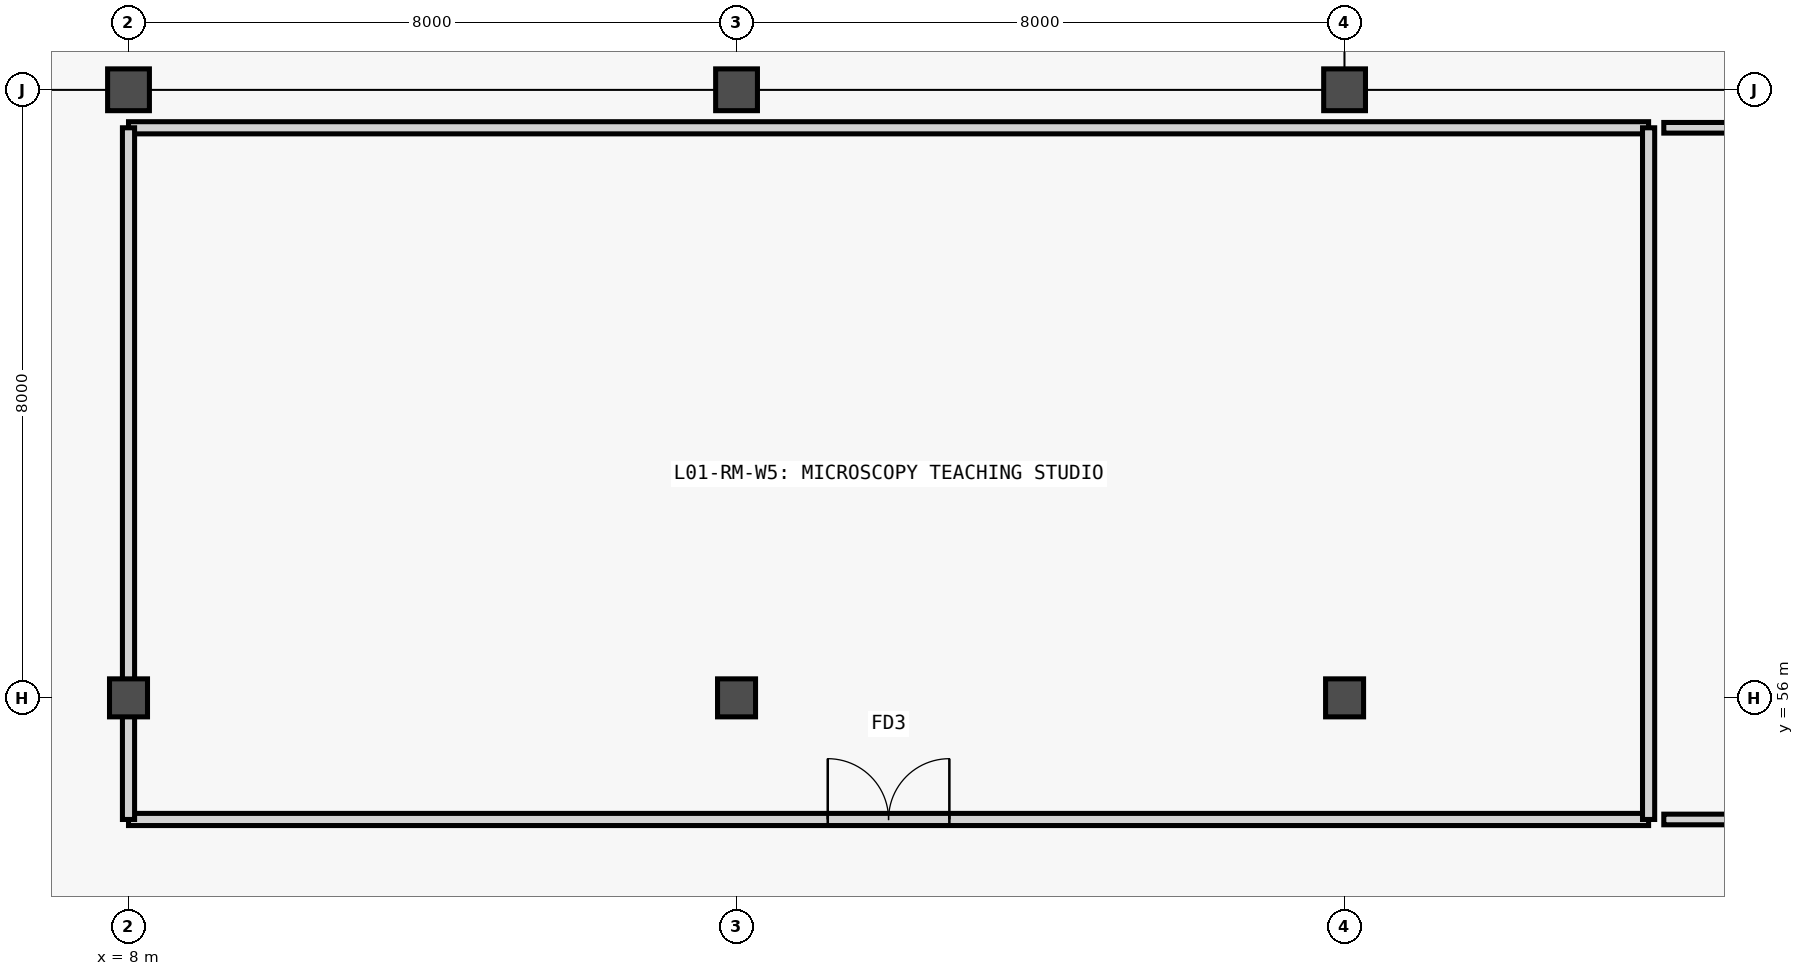
"""IFC4 building model, lengths in metres.
Left out: names, types, materials, properties, quantities, classifications, styles, units other than length and angle.
Written with IfcOpenShell. Run it as: python <this file> out.ifc"""

import sys

from ifc_helpers import new_model, si_unit, direction, frame, frame_2d, origin, origin_2d, place, context, subcontext, project, spatial, rectangle, extrude, element, fill, save


model = new_model("IFC4")
c1 = context("Model", 3, precision=1e-05, world=origin(), true_north=direction((0.0, 1.0)))
c2 = subcontext(c1, "Body", "Model", "MODEL_VIEW")
j1 = project(units=[si_unit("LENGTHUNIT", "METRE"), si_unit("PLANEANGLEUNIT", "RADIAN")], contexts=[c1])
p1 = place(None, origin())
s1 = spatial("IfcSite", under=j1, at=p1, CompositionType="ELEMENT")
p2 = place(p1, origin())
s2 = spatial("IfcBuilding", under=s1, at=p2, CompositionType="ELEMENT")
p3 = place(p2, frame((0.0, 0.0, 5.4)))
s3 = spatial("IfcBuildingStorey", under=s2, at=p3, CompositionType="ELEMENT", Elevation=5.4)
p4 = place(p3, frame((8.0, 56.0, 0.0), z_axis=(0.0, 0.0, 1.0), x_axis=(1.0, 0.0, 0.0)))
e1 = element("IfcColumn", 1, at=p4, inside=s3, PredefinedType="COLUMN", context=c2, shape_type="SweptSolid", body=[
    extrude(rectangle(XDim=0.5, YDim=0.5, at=origin_2d()), origin(), (0.0, 0.0, 1.0), 4.8),
])
p5 = place(p3, frame((8.0, 64.0, 0.0), z_axis=(0.0, 0.0, 1.0), x_axis=(1.0, 0.0, 0.0)))
e2 = element("IfcColumn", 2, at=p5, inside=s3, PredefinedType="COLUMN", context=c2, shape_type="SweptSolid", body=[
    extrude(rectangle(XDim=0.55, YDim=0.55, at=origin_2d()), origin(), (0.0, 0.0, 1.0), 4.8),
])
p6 = place(p3, frame((16.0, 56.0, 0.0), z_axis=(0.0, 0.0, 1.0), x_axis=(1.0, 0.0, 0.0)))
e3 = element("IfcColumn", 3, at=p6, inside=s3, PredefinedType="COLUMN", context=c2, shape_type="SweptSolid", body=[
    extrude(rectangle(XDim=0.5, YDim=0.5, at=origin_2d()), origin(), (0.0, 0.0, 1.0), 4.8),
])
p7 = place(p3, frame((16.0, 64.0, 0.0), z_axis=(0.0, 0.0, 1.0), x_axis=(1.0, 0.0, 0.0)))
e4 = element("IfcColumn", 4, at=p7, inside=s3, PredefinedType="COLUMN", context=c2, shape_type="SweptSolid", body=[
    extrude(rectangle(XDim=0.55, YDim=0.55, at=origin_2d()), origin(), (0.0, 0.0, 1.0), 4.8),
])
p8 = place(p3, frame((24.0, 56.0, 0.0), z_axis=(0.0, 0.0, 1.0), x_axis=(1.0, 0.0, 0.0)))
e5 = element("IfcColumn", 5, at=p8, inside=s3, PredefinedType="COLUMN", context=c2, shape_type="SweptSolid", body=[
    extrude(rectangle(XDim=0.5, YDim=0.5, at=origin_2d()), origin(), (0.0, 0.0, 1.0), 4.8),
])
p9 = place(p3, frame((24.0, 64.0, 0.0), z_axis=(0.0, 0.0, 1.0), x_axis=(1.0, 0.0, 0.0)))
e6 = element("IfcColumn", 6, at=p9, inside=s3, PredefinedType="COLUMN", context=c2, shape_type="SweptSolid", body=[
    extrude(rectangle(XDim=0.55, YDim=0.55, at=origin_2d()), origin(), (0.0, 0.0, 1.0), 4.8),
])
p10 = place(p3, frame((8.0, 54.4, 0.0), z_axis=(0.0, 0.0, 1.0), x_axis=(1.0, 0.0, 0.0)))
e7 = element("IfcWall", 7, at=p10, inside=s3, PredefinedType="PARTITIONING", context=c2, shape_type="SweptSolid", body=[
    extrude(rectangle(XDim=20.0, YDim=0.16, at=frame_2d((10.0, 0.0))), origin(), (0.0, 0.0, 1.0), 4.54),
])
p11 = place(p10, frame((9.2, 0.0, 0.0)))
e8 = element("IfcOpeningElement", 8, at=p11, cuts=e7, PredefinedType="OPENING", context=c2, shape_type="SweptSolid", body=[
    extrude(rectangle(XDim=1.6, YDim=2.2, at=frame_2d((0.8, 1.1))), frame((0.0, 0.09, 0.0), z_axis=(0.0, -1.0, 0.0), x_axis=(1.0, 0.0, 0.0)), (0.0, 0.0, 1.0), 0.18),
])
p12 = place(p3, frame((8.0, 63.5, 0.0), z_axis=(0.0, 0.0, 1.0), x_axis=(1.0, 0.0, 0.0)))
e9 = element("IfcWall", 9, at=p12, inside=s3, PredefinedType="PARTITIONING", context=c2, shape_type="SweptSolid", body=[
    extrude(rectangle(XDim=20.0, YDim=0.16, at=frame_2d((10.0, 0.0))), origin(), (0.0, 0.0, 1.0), 4.54),
])
p13 = place(p3, frame((8.0, 54.4, 0.0), z_axis=(0.0, 0.0, 1.0), x_axis=(0.0, 1.0, 0.0)))
e10 = element("IfcWall", 10, at=p13, inside=s3, PredefinedType="PARTITIONING", context=c2, shape_type="SweptSolid", body=[
    extrude(rectangle(XDim=9.1, YDim=0.16, at=frame_2d((4.55, 0.0))), origin(), (0.0, 0.0, 1.0), 3.92),
])
p14 = place(p3, frame((28.0, 54.4, 0.0), z_axis=(0.0, 0.0, 1.0), x_axis=(0.0, 1.0, 0.0)))
e11 = element("IfcWall", 11, at=p14, inside=s3, PredefinedType="PARTITIONING", context=c2, shape_type="SweptSolid", body=[
    extrude(rectangle(XDim=9.1, YDim=0.16, at=frame_2d((4.55, 0.0))), origin(), (0.0, 0.0, 1.0), 4.08),
])
p15 = place(p3, frame((28.2, 54.4, 0.0), z_axis=(0.0, 0.0, 1.0), x_axis=(1.0, 0.0, 0.0)))
e12 = element("IfcWall", 12, at=p15, inside=s3, PredefinedType="PARTITIONING", context=c2, shape_type="SweptSolid", body=[
    extrude(rectangle(XDim=27.3, YDim=0.14, at=frame_2d((13.65, 0.0))), origin(), (0.0, 0.0, 1.0), 4.54),
])
p16 = place(p15, frame((13.175, 0.0, 0.0)))
e13 = element("IfcOpeningElement", 13, at=p16, cuts=e12, PredefinedType="OPENING", context=c2, shape_type="SweptSolid", body=[
    extrude(rectangle(XDim=0.95, YDim=2.1, at=frame_2d((0.475, 1.05))), frame((0.0, 0.08, 0.0), z_axis=(0.0, -1.0, 0.0), x_axis=(1.0, 0.0, 0.0)), (0.0, 0.0, 1.0), 0.16),
])
p17 = place(p3, frame((28.2, 63.5, 0.0), z_axis=(0.0, 0.0, 1.0), x_axis=(1.0, 0.0, 0.0)))
e14 = element("IfcWall", 14, at=p17, inside=s3, PredefinedType="PARTITIONING", context=c2, shape_type="SweptSolid", body=[
    extrude(rectangle(XDim=27.3, YDim=0.14, at=frame_2d((13.65, 0.0))), origin(), (0.0, 0.0, 1.0), 4.54),
])
p18 = place(p11, origin())
e15 = element("IfcDoor", 15, at=p18, inside=s3, OperationType="DOUBLE_DOOR_SINGLE_SWING", PredefinedType="DOOR", context=c2, shape_type="SweptSolid", body=[
    extrude(rectangle(XDim=1.6, YDim=2.2, at=frame_2d((0.8, 1.1))), frame((0.0, 0.025, 0.0), z_axis=(0.0, -1.0, 0.0), x_axis=(1.0, 0.0, 0.0)), (0.0, 0.0, 1.0), 0.05),
])
fill(e8, e15)
save(model, sys.argv[1])
